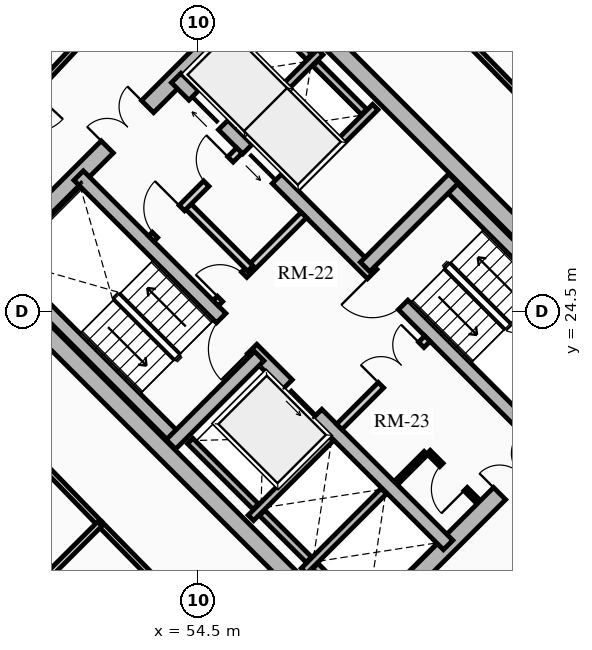
"""IFC4 building model, lengths in metres.
Left out: names, types, materials, properties, quantities, classifications, styles, units other than length and angle.
Written with IfcOpenShell. Run it as: python <this file> out.ifc"""

import sys

from ifc_helpers import new_model, si_unit, direction, frame, frame_2d, origin, place, context, subcontext, project, spatial, rectangle, extrude, source, transform, mapped, element, fill, save


model = new_model("IFC4")
c1 = context("Model", 3, precision=1e-05, world=origin(), true_north=direction((0.0, 1.0)))
c2 = subcontext(c1, "Body", "Model", "MODEL_VIEW")
j1 = project(units=[si_unit("LENGTHUNIT", "METRE"), si_unit("PLANEANGLEUNIT", "RADIAN")], contexts=[c1])
p1 = place(None, origin())
s1 = spatial("IfcSite", under=j1, at=p1, CompositionType="ELEMENT")
p2 = place(p1, origin())
s2 = spatial("IfcBuilding", under=s1, at=p2, CompositionType="ELEMENT")
p3 = place(p2, frame((0.0, 0.0, 81.79)))
s3 = spatial("IfcBuildingStorey", under=s2, at=p3, CompositionType="ELEMENT", Elevation=81.79)
for number, where, z_axis, x_axis in (
    (1, (58.737, 15.697, 0.0), (0.0, 0.0, 1.0), (-0.707, 0.707, 0.0)),
    (2, (66.303, 23.263, 0.0), (0.0, 0.0, 1.0), (-0.707, 0.707, 0.0)),
):
    element("IfcWall", number, at=place(p3, frame(where, z_axis=z_axis, x_axis=x_axis)), inside=s3, PredefinedType="SHEAR", context=c2, shape_type="SweptSolid", body=[
        extrude(rectangle(XDim=14.2, YDim=0.45, at=frame_2d((7.1, 0.0))), origin(), (0.0, 0.0, 1.0), 2.91),
    ])
p4 = place(p3, frame((58.578, 15.856, 0.0), z_axis=(0.0, 0.0, 1.0), x_axis=(0.707106781187, 0.707106781187, 0.0)))
e3 = element("IfcWall", 3, at=p4, inside=s3, PredefinedType="SHEAR", context=c2, shape_type="SweptSolid", body=[
    extrude(rectangle(XDim=10.7, YDim=0.45, at=frame_2d((5.35, 0.0))), origin(), (0.0, 0.0, 1.0), 2.91),
])
m1 = source(origin(), c2, "Body", "SweptSolid", [
    extrude(rectangle(XDim=1.5, YDim=2.02, at=frame_2d((0.75, 1.01))), frame((0.0, 0.235, 0.0), z_axis=(0.0, -1.0, 0.0), x_axis=(1.0, 0.0, 0.0)), (0.0, 0.0, 1.0), 0.47),
])
p5 = place(p4, frame((5.45, 0.0, 0.0)))
e4 = element("IfcOpeningElement", 4, at=p5, cuts=e3, PredefinedType="OPENING", context=c2, shape_type="MappedRepresentation", body=[
    mapped(m1, transform((0.0, 0.0, 0.0), x_axis=(1.0, 0.0, 0.0), y_axis=(0.0, 1.0, 0.0), z_axis=(0.0, 0.0, 1.0), scale=1.0)),
])
p6 = place(p3, frame((48.856, 25.578, 0.0), z_axis=(0.0, 0.0, 1.0), x_axis=(0.707106781187, 0.707106781187, 0.0)))
e5 = element("IfcWall", 5, at=p6, inside=s3, PredefinedType="SHEAR", context=c2, shape_type="SweptSolid", body=[
    extrude(rectangle(XDim=10.7, YDim=0.45, at=frame_2d((5.35, 0.0))), origin(), (0.0, 0.0, 1.0), 2.91),
])
p7 = place(p6, frame((4.6, 0.0, 0.0)))
e6 = element("IfcOpeningElement", 6, at=p7, cuts=e5, PredefinedType="OPENING", context=c2, shape_type="MappedRepresentation", body=[
    mapped(m1, transform((0.0, 0.0, 0.0), x_axis=(1.0, 0.0, 0.0), y_axis=(0.0, 1.0, 0.0), z_axis=(0.0, 0.0, 1.0), scale=1.0)),
])
p8 = place(p3, frame((61.078, 18.355, 0.0), z_axis=(0.0, 0.0, 1.0), x_axis=(-0.707106781187, 0.707106781187, 0.0)))
e7 = element("IfcWall", 7, at=p8, inside=s3, PredefinedType="SHEAR", context=c2, shape_type="SweptSolid", body=[
    extrude(rectangle(XDim=13.75, YDim=0.35, at=frame_2d((6.875, 0.0))), origin(), (0.0, 0.0, 1.0), 2.91),
])
m2 = source(origin(), c2, "Body", "SweptSolid", [
    extrude(rectangle(XDim=1.1, YDim=2.015, at=frame_2d((0.55, 1.007))), frame((0.0, 0.185, 0.0), z_axis=(0.0, -1.0, 0.0), x_axis=(1.0, 0.0, 0.0)), (0.0, 0.0, 1.0), 0.37),
])
p9 = place(p8, frame((4.875, 0.0, 0.0)))
e8 = element("IfcOpeningElement", 8, at=p9, cuts=e7, PredefinedType="OPENING", context=c2, shape_type="MappedRepresentation", body=[
    mapped(m2, transform((0.0, 0.0, 0.0), x_axis=(1.0, 0.0, 0.0), y_axis=(0.0, 1.0, 0.0), z_axis=(0.0, 0.0, 1.0), scale=1.0)),
])
m3 = source(origin(), c2, "Body", "SweptSolid", [
    extrude(rectangle(XDim=1.15, YDim=2.02, at=frame_2d((0.575, 1.01))), frame((0.0, 0.185, 0.0), z_axis=(0.0, -1.0, 0.0), x_axis=(1.0, 0.0, 0.0)), (0.0, 0.0, 1.0), 0.37),
])
p10 = place(p8, frame((7.295, 0.0, 0.0)))
e9 = element("IfcOpeningElement", 9, at=p10, cuts=e7, PredefinedType="OPENING", context=c2, shape_type="MappedRepresentation", body=[
    mapped(m3, transform((0.0, 0.0, 0.0), x_axis=(1.0, 0.0, 0.0), y_axis=(0.0, 1.0, 0.0), z_axis=(0.0, 0.0, 1.0), scale=1.0)),
])
p11 = place(p3, frame((63.645, 20.922, 0.0), z_axis=(0.0, 0.0, 1.0), x_axis=(-0.707106781187, 0.707106781187, 0.0)))
e10 = element("IfcWall", 10, at=p11, inside=s3, PredefinedType="SHEAR", context=c2, shape_type="SweptSolid", body=[
    extrude(rectangle(XDim=13.75, YDim=0.35, at=frame_2d((6.875, 0.0))), origin(), (0.0, 0.0, 1.0), 2.91),
])
p12 = place(p11, frame((10.0, 0.0, 0.0)))
e11 = element("IfcOpeningElement", 11, at=p12, cuts=e10, PredefinedType="OPENING", context=c2, shape_type="MappedRepresentation", body=[
    mapped(m2, transform((0.0, 0.0, 0.0), x_axis=(1.0, 0.0, 0.0), y_axis=(0.0, 1.0, 0.0), z_axis=(0.0, 0.0, 1.0), scale=1.0)),
])
p13 = place(p11, frame((12.0, 0.0, 0.0)))
e12 = element("IfcOpeningElement", 12, at=p13, cuts=e10, PredefinedType="OPENING", context=c2, shape_type="MappedRepresentation", body=[
    mapped(m2, transform((0.0, 0.0, 0.0), x_axis=(1.0, 0.0, 0.0), y_axis=(0.0, 1.0, 0.0), z_axis=(0.0, 0.0, 1.0), scale=1.0)),
])
p14 = place(p11, frame((5.305, 0.0, 0.0)))
e13 = element("IfcOpeningElement", 13, at=p14, cuts=e10, PredefinedType="OPENING", context=c2, shape_type="MappedRepresentation", body=[
    mapped(m3, transform((0.0, 0.0, 0.0), x_axis=(1.0, 0.0, 0.0), y_axis=(0.0, 1.0, 0.0), z_axis=(0.0, 0.0, 1.0), scale=1.0)),
])
p15 = place(p3, frame((53.922, 21.141, 0.0), z_axis=(0.0, 0.0, 1.0), x_axis=(-0.707088616009, 0.707124945897, 0.0)))
e14 = element("IfcWall", 14, at=p15, inside=s3, PredefinedType="SHEAR", context=c2, shape_type="SweptSolid", body=[
    extrude(rectangle(XDim=6.72, YDim=0.35, at=frame_2d((3.36, 0.0))), origin(), (0.0, 0.0, 1.0), 2.91),
])
p16 = place(p3, frame((53.784, 21.003, 0.0), z_axis=(0.0, 0.0, 1.0), x_axis=(0.707106781187, 0.707106781187, 0.0)))
e15 = element("IfcWall", 15, at=p16, inside=s3, PredefinedType="SHEAR", context=c2, shape_type="SweptSolid", body=[
    extrude(rectangle(XDim=3.285, YDim=0.35, at=frame_2d((1.643, 0.0))), origin(), (0.0, 0.0, 1.0), 2.91),
])
p17 = place(p3, frame((65.83, 23.107, 0.0), z_axis=(0.0, 0.0, 1.0), x_axis=(-0.707088616009, 0.707124945897, 0.0)))
e16 = element("IfcWall", 16, at=p17, inside=s3, PredefinedType="SHEAR", context=c2, shape_type="SweptSolid", body=[
    extrude(rectangle(XDim=6.72, YDim=0.35, at=frame_2d((3.36, 0.0))), origin(), (0.0, 0.0, 1.0), 2.91),
])
p18 = place(p3, frame((58.893, 25.674, 0.0), z_axis=(0.0, 0.0, 1.0), x_axis=(0.707106781187, 0.707106781187, 0.0)))
e17 = element("IfcWall", 17, at=p18, inside=s3, PredefinedType="SHEAR", context=c2, shape_type="SweptSolid", body=[
    extrude(rectangle(XDim=3.285, YDim=0.35, at=frame_2d((1.643, 0.0))), origin(), (0.0, 0.0, 1.0), 2.91),
])
p19 = place(p3, frame((55.888, 19.069, 0.0), z_axis=(0.0, 0.0, 1.0), x_axis=(0.707106781187, 0.707106781187, 0.0)))
e18 = element("IfcWall", 18, at=p19, inside=s3, PredefinedType="SHEAR", context=c2, shape_type="SweptSolid", body=[
    extrude(rectangle(XDim=2.97, YDim=0.2, at=frame_2d((1.485, 0.0))), origin(), (0.0, 0.0, 1.0), 2.91),
])
p20 = place(p3, frame((56.015, 19.366, 0.0), z_axis=(0.0, 0.0, 1.0), x_axis=(-0.707106781187, 0.707106781187, 0.0)))
e19 = element("IfcWall", 19, at=p20, inside=s3, PredefinedType="SHEAR", context=c2, shape_type="SweptSolid", body=[
    extrude(rectangle(XDim=2.44, YDim=0.2, at=frame_2d((1.22, 0.0))), origin(), (0.0, 0.0, 1.0), 2.91),
])
p21 = place(p3, frame((57.284, 17.673, 0.0), z_axis=(0.0, 0.0, 1.0), x_axis=(0.707147878904, 0.70706568108, 0.0)))
e20 = element("IfcWall", 20, at=p21, inside=s3, PredefinedType="SHEAR", context=c2, shape_type="SweptSolid", body=[
    extrude(rectangle(XDim=2.97, YDim=0.2, at=frame_2d((1.485, 0.0))), origin(), (0.0, 0.0, 1.0), 2.91),
])
p22 = place(p3, frame((57.412, 17.97, 0.0), z_axis=(0.0, 0.0, 1.0), x_axis=(-0.707106781187, 0.707106781187, 0.0)))
e21 = element("IfcWall", 21, at=p22, inside=s3, PredefinedType="SHEAR", context=c2, shape_type="SweptSolid", body=[
    extrude(rectangle(XDim=1.735, YDim=0.2, at=frame_2d((0.867, 0.0))), origin(), (0.0, 0.0, 1.0), 2.91),
])
p23 = place(p3, frame((58.737, 16.644, 0.0), z_axis=(0.0, 0.0, 1.0), x_axis=(-0.707032117043, 0.707181437447, 0.0)))
e22 = element("IfcWall", 22, at=p23, inside=s3, PredefinedType="SHEAR", context=c2, shape_type="SweptSolid", body=[
    extrude(rectangle(XDim=1.635, YDim=0.2, at=frame_2d((0.817, 0.0))), origin(), (0.0, 0.0, 1.0), 2.91),
])
p24 = place(p3, frame((57.062, 27.781, 0.0), z_axis=(0.0, 0.0, 1.0), x_axis=(0.707106781187, 0.707106781187, 0.0)))
e23 = element("IfcWall", 23, at=p24, inside=s3, PredefinedType="SHEAR", context=c2, shape_type="SweptSolid", body=[
    extrude(rectangle(XDim=2.97, YDim=0.2, at=frame_2d((1.485, 0.0))), origin(), (0.0, 0.0, 1.0), 2.91),
])
p25 = place(p3, frame((55.615, 29.227, 0.0), z_axis=(0.0, 0.0, 1.0), x_axis=(0.707147878904, 0.70706568108, 0.0)))
e24 = element("IfcWall", 24, at=p25, inside=s3, PredefinedType="SHEAR", context=c2, shape_type="SweptSolid", body=[
    extrude(rectangle(XDim=2.97, YDim=0.2, at=frame_2d((1.485, 0.0))), origin(), (0.0, 0.0, 1.0), 2.91),
])
p26 = place(p3, frame((58.865, 29.754, 0.0), z_axis=(0.0, 0.0, 1.0), x_axis=(-0.707174411312, 0.707039144592, 0.0)))
e25 = element("IfcWall", 25, at=p26, inside=s3, PredefinedType="SHEAR", context=c2, shape_type="SweptSolid", body=[
    extrude(rectangle(XDim=1.805, YDim=0.2, at=frame_2d((0.902, 0.0))), origin(), (0.0, 0.0, 1.0), 2.91),
])
p27 = place(p3, frame((57.419, 31.2, 0.0), z_axis=(0.0, 0.0, 1.0), x_axis=(-0.707032117043, 0.707181437447, 0.0)))
e26 = element("IfcWall", 26, at=p27, inside=s3, PredefinedType="SHEAR", context=c2, shape_type="SweptSolid", body=[
    extrude(rectangle(XDim=1.635, YDim=0.2, at=frame_2d((0.817, 0.0))), origin(), (0.0, 0.0, 1.0), 2.91),
])
p28 = place(p3, frame((58.214, 21.467, 0.0), z_axis=(0.0, 0.0, 1.0), x_axis=(0.707106781187, 0.707106781187, 0.0)))
e27 = element("IfcWall", 27, at=p28, inside=s3, PredefinedType="PARTITIONING", context=c2, shape_type="SweptSolid", body=[
    extrude(rectangle(XDim=3.28, YDim=0.2, at=frame_2d((1.64, 0.0))), origin(), (0.0, 0.0, 1.0), 2.655),
])
m4 = source(origin(), c2, "Body", "SweptSolid", [
    extrude(rectangle(XDim=1.5, YDim=2.02, at=frame_2d((0.75, 1.01))), frame((0.0, 0.11, 0.0), z_axis=(0.0, -1.0, 0.0), x_axis=(1.0, 0.0, 0.0)), (0.0, 0.0, 1.0), 0.22),
])
p29 = place(p28, frame((1.55, 0.0, 0.0)))
e28 = element("IfcOpeningElement", 28, at=p29, cuts=e27, PredefinedType="OPENING", context=c2, shape_type="MappedRepresentation", body=[
    mapped(m4, transform((0.0, 0.0, 0.0), x_axis=(1.0, 0.0, 0.0), y_axis=(0.0, 1.0, 0.0), z_axis=(0.0, 0.0, 1.0), scale=1.0)),
])
p30 = place(p3, frame((54.961, 24.719, 0.0), z_axis=(0.0, 0.0, 1.0), x_axis=(0.707106781187, 0.707106781187, 0.0)))
e29 = element("IfcWall", 29, at=p30, inside=s3, PredefinedType="PARTITIONING", context=c2, shape_type="SweptSolid", body=[
    extrude(rectangle(XDim=3.28, YDim=0.2, at=frame_2d((1.64, 0.0))), origin(), (0.0, 0.0, 1.0), 2.655),
])
m5 = source(origin(), c2, "Body", "SweptSolid", [
    extrude(rectangle(XDim=0.9, YDim=2.005, at=frame_2d((0.45, 1.002))), frame((0.0, 0.11, 0.0), z_axis=(0.0, -1.0, 0.0), x_axis=(1.0, 0.0, 0.0)), (0.0, 0.0, 1.0), 0.22),
])
p31 = place(p30, frame((0.16, 0.0, 0.0)))
e30 = element("IfcOpeningElement", 30, at=p31, cuts=e29, PredefinedType="OPENING", context=c2, shape_type="MappedRepresentation", body=[
    mapped(m5, transform((0.0, 0.0, 0.0), x_axis=(1.0, 0.0, 0.0), y_axis=(0.0, 1.0, 0.0), z_axis=(0.0, 0.0, 1.0), scale=1.0)),
])
p32 = place(p3, frame((55.874, 25.631, 0.0), z_axis=(0.0, 0.0, 1.0), x_axis=(-0.707157639372, 0.707055919343, 0.0)))
e31 = element("IfcWall", 31, at=p32, inside=s3, PredefinedType="PARTITIONING", context=c2, shape_type="SweptSolid", body=[
    extrude(rectangle(XDim=2.4, YDim=0.2, at=frame_2d((1.2, 0.0))), origin(), (0.0, 0.0, 1.0), 2.655),
])
p33 = place(p3, frame((53.264, 26.416, 0.0), z_axis=(0.0, 0.0, 1.0), x_axis=(0.707106781187, 0.707106781187, 0.0)))
e32 = element("IfcWall", 32, at=p33, inside=s3, PredefinedType="PARTITIONING", context=c2, shape_type="SweptSolid", body=[
    extrude(rectangle(XDim=3.28, YDim=0.2, at=frame_2d((1.64, 0.0))), origin(), (0.0, 0.0, 1.0), 2.655),
])
m6 = source(origin(), c2, "Body", "SweptSolid", [
    extrude(rectangle(XDim=1.0, YDim=2.015, at=frame_2d((0.5, 1.007))), frame((0.0, 0.11, 0.0), z_axis=(0.0, -1.0, 0.0), x_axis=(1.0, 0.0, 0.0)), (0.0, 0.0, 1.0), 0.22),
])
p34 = place(p33, frame((0.14, 0.0, 0.0)))
e33 = element("IfcOpeningElement", 33, at=p34, cuts=e32, PredefinedType="OPENING", context=c2, shape_type="MappedRepresentation", body=[
    mapped(m6, transform((0.0, 0.0, 0.0), x_axis=(1.0, 0.0, 0.0), y_axis=(0.0, 1.0, 0.0), z_axis=(0.0, 0.0, 1.0), scale=1.0)),
])
p35 = place(p33, frame((2.05, 0.0, 0.0)))
e34 = element("IfcOpeningElement", 34, at=p35, cuts=e32, PredefinedType="OPENING", context=c2, shape_type="MappedRepresentation", body=[
    mapped(m5, transform((0.0, 0.0, 0.0), x_axis=(1.0, 0.0, 0.0), y_axis=(0.0, 1.0, 0.0), z_axis=(0.0, 0.0, 1.0), scale=1.0)),
])
p36 = place(p3, frame((61.835, 19.529, 0.0), z_axis=(0.0, 0.0, 1.0), x_axis=(-0.707174592913, 0.707038962956, 0.0)))
e35 = element("IfcWall", 35, at=p36, inside=s3, PredefinedType="PARTITIONING", context=c2, shape_type="SweptSolid", body=[
    extrude(rectangle(XDim=1.8, YDim=0.125, at=frame_2d((0.9, 0.0))), origin(), (0.0, 0.0, 1.0), 2.655),
])
m7 = source(origin(), c2, "Body", "SweptSolid", [
    extrude(rectangle(XDim=0.9, YDim=2.005, at=frame_2d((0.45, 1.002))), frame((0.0, 0.073, 0.0), z_axis=(0.0, -1.0, 0.0), x_axis=(1.0, 0.0, 0.0)), (0.0, 0.0, 1.0), 0.145),
])
p37 = place(p36, frame((0.42, 0.0, 0.0)))
e36 = element("IfcOpeningElement", 36, at=p37, cuts=e35, PredefinedType="OPENING", context=c2, shape_type="MappedRepresentation", body=[
    mapped(m7, transform((0.0, 0.0, 0.0), x_axis=(1.0, 0.0, 0.0), y_axis=(0.0, 1.0, 0.0), z_axis=(0.0, 0.0, 1.0), scale=1.0)),
])
p38 = place(p3, frame((59.713, 19.996, 0.0), z_axis=(0.0, 0.0, 1.0), x_axis=(0.707217726, 0.706995818963, 0.0)))
e37 = element("IfcWall", 37, at=p38, inside=s3, PredefinedType="PARTITIONING", context=c2, shape_type="SweptSolid", body=[
    extrude(rectangle(XDim=1.1, YDim=0.125, at=frame_2d((0.55, 0.0))), origin(), (0.0, 0.0, 1.0), 2.655),
])
p39 = place(p3, frame((63.086, 30.086, 0.0), z_axis=(0.0, 0.0, 1.0), x_axis=(-0.699075897379, 0.715047473741, 0.0)))
e38 = element("IfcWall", 38, at=p39, inside=s3, PredefinedType="PARTITIONING", context=c2, shape_type="SweptSolid", body=[
    extrude(rectangle(XDim=6.114, YDim=0.15, at=frame_2d((3.057, 0.0))), origin(), (0.0, 0.0, 1.0), 2.225),
])
p40 = place(p3, frame((52.043, 32.28, 0.0), z_axis=(0.0, 0.0, 1.0), x_axis=(-0.682606081633, -0.730786519661, 0.0)))
e39 = element("IfcWall", 39, at=p40, inside=s3, PredefinedType="PARTITIONING", context=c2, shape_type="SweptSolid", body=[
    extrude(rectangle(XDim=6.527, YDim=0.15, at=frame_2d((3.263, 0.0))), origin(), (0.0, 0.0, 1.0), 2.225),
])
m8 = source(origin(), c2, "Body", "SweptSolid", [
    extrude(rectangle(XDim=1.05, YDim=2.015, at=frame_2d((0.525, 1.007))), frame((0.0, 0.085, 0.0), z_axis=(0.0, -1.0, 0.0), x_axis=(1.0, 0.0, 0.0)), (0.0, 0.0, 1.0), 0.17),
])
p41 = place(p40, frame((2.738, 0.0, 0.0)))
e40 = element("IfcOpeningElement", 40, at=p41, cuts=e39, PredefinedType="OPENING", context=c2, shape_type="MappedRepresentation", body=[
    mapped(m8, transform((0.0, 0.0, 0.0), x_axis=(1.0, 0.0, 0.0), y_axis=(0.0, 1.0, 0.0), z_axis=(0.0, 0.0, 1.0), scale=1.0)),
])
p42 = place(p3, frame((47.706, 23.253, 0.0), z_axis=(0.0, 0.0, 1.0), x_axis=(0.696179266346, -0.717867974707, 0.0)))
e41 = element("IfcWall", 41, at=p42, inside=s3, PredefinedType="PARTITIONING", context=c2, shape_type="SweptSolid", body=[
    extrude(rectangle(XDim=6.045, YDim=0.15, at=frame_2d((3.022, 0.0))), origin(), (0.0, 0.0, 1.0), 2.655),
])
p43 = place(p42, frame((2.497, 0.0, 0.0)))
e42 = element("IfcOpeningElement", 42, at=p43, cuts=e41, PredefinedType="OPENING", context=c2, shape_type="MappedRepresentation", body=[
    mapped(m8, transform((0.0, 0.0, 0.0), x_axis=(1.0, 0.0, 0.0), y_axis=(0.0, 1.0, 0.0), z_axis=(0.0, 0.0, 1.0), scale=1.0)),
])
p44 = place(p3, frame((51.914, 18.914, 0.0), z_axis=(0.0, 0.0, 1.0), x_axis=(0.699999313799, -0.714143515465, 0.0)))
e43 = element("IfcWall", 43, at=p44, inside=s3, PredefinedType="PARTITIONING", context=c2, shape_type="SweptSolid", body=[
    extrude(rectangle(XDim=6.162, YDim=0.15, at=frame_2d((3.081, 0.0))), origin(), (0.0, 0.0, 1.0), 2.225),
])
p45 = place(p3, frame((51.914, 18.914, 0.0), z_axis=(0.0, 0.0, 1.0), x_axis=(-0.707106781187, -0.707106781187, 0.0)))
e44 = element("IfcWall", 44, at=p45, inside=s3, PredefinedType="PARTITIONING", context=c2, shape_type="SweptSolid", body=[
    extrude(rectangle(XDim=7.661, YDim=0.16, at=frame_2d((3.831, 0.0))), origin(), (0.0, 0.0, 1.0), 2.179),
])
m9 = source(origin(), c2, "Body", "SweptSolid", [
    extrude(rectangle(XDim=1.1, YDim=2.015, at=frame_2d((0.55, 1.007))), frame((0.0, 0.025, 0.0), z_axis=(0.0, -1.0, 0.0), x_axis=(1.0, 0.0, 0.0)), (0.0, 0.0, 1.0), 0.05),
])
p46 = place(p9, origin())
e45 = element("IfcDoor", 45, at=p46, inside=s3, OperationType="SLIDING_TO_LEFT", PredefinedType="DOOR", context=c2, shape_type="MappedRepresentation", body=[
    mapped(m9, transform((0.0, 0.0, 0.0), x_axis=(1.0, 0.0, 0.0), y_axis=(0.0, 1.0, 0.0), z_axis=(0.0, 0.0, 1.0), scale=1.0)),
])
fill(e8, e45)
p47 = place(p12, origin())
e46 = element("IfcDoor", 46, at=p47, inside=s3, OperationType="SLIDING_TO_LEFT", PredefinedType="DOOR", context=c2, shape_type="MappedRepresentation", body=[
    mapped(m9, transform((0.0, 0.0, 0.0), x_axis=(1.0, 0.0, 0.0), y_axis=(0.0, 1.0, 0.0), z_axis=(0.0, 0.0, 1.0), scale=1.0)),
])
fill(e11, e46)
p48 = place(p13, origin())
e47 = element("IfcDoor", 47, at=p48, inside=s3, OperationType="SLIDING_TO_RIGHT", PredefinedType="DOOR", context=c2, shape_type="MappedRepresentation", body=[
    mapped(m9, transform((0.0, 0.0, 0.0), x_axis=(1.0, 0.0, 0.0), y_axis=(0.0, 1.0, 0.0), z_axis=(0.0, 0.0, 1.0), scale=1.0)),
])
fill(e12, e47)
m10 = source(origin(), c2, "Body", "SweptSolid", [
    extrude(rectangle(XDim=1.15, YDim=2.02, at=frame_2d((0.575, 1.01))), frame((0.0, 0.025, 0.0), z_axis=(0.0, -1.0, 0.0), x_axis=(1.0, 0.0, 0.0)), (0.0, 0.0, 1.0), 0.05),
])
p49 = place(p10, origin())
e48 = element("IfcDoor", 48, at=p49, inside=s3, OperationType="SINGLE_SWING_LEFT", PredefinedType="DOOR", context=c2, shape_type="MappedRepresentation", body=[
    mapped(m10, transform((0.0, 0.0, 0.0), x_axis=(1.0, 0.0, 0.0), y_axis=(0.0, 1.0, 0.0), z_axis=(0.0, 0.0, 1.0), scale=1.0)),
])
fill(e9, e48)
p50 = place(p14, origin())
e49 = element("IfcDoor", 49, at=p50, inside=s3, OperationType="SINGLE_SWING_RIGHT", PredefinedType="DOOR", context=c2, shape_type="MappedRepresentation", body=[
    mapped(m10, transform((0.0, 0.0, 0.0), x_axis=(1.0, 0.0, 0.0), y_axis=(0.0, 1.0, 0.0), z_axis=(0.0, 0.0, 1.0), scale=1.0)),
])
fill(e13, e49)
m11 = source(origin(), c2, "Body", "SweptSolid", [
    extrude(rectangle(XDim=1.5, YDim=2.02, at=frame_2d((0.75, 1.01))), frame((0.0, 0.025, 0.0), z_axis=(0.0, -1.0, 0.0), x_axis=(1.0, 0.0, 0.0)), (0.0, 0.0, 1.0), 0.05),
])
p51 = place(p7, origin())
e50 = element("IfcDoor", 50, at=p51, inside=s3, OperationType="DOUBLE_DOOR_SINGLE_SWING", PredefinedType="DOOR", context=c2, shape_type="MappedRepresentation", body=[
    mapped(m11, transform((0.0, 0.0, 0.0), x_axis=(1.0, 0.0, 0.0), y_axis=(0.0, 1.0, 0.0), z_axis=(0.0, 0.0, 1.0), scale=1.0)),
])
fill(e6, e50)
p52 = place(p5, origin())
e51 = element("IfcDoor", 51, at=p52, inside=s3, OperationType="DOUBLE_DOOR_SINGLE_SWING", PredefinedType="DOOR", context=c2, shape_type="MappedRepresentation", body=[
    mapped(m11, transform((0.0, 0.0, 0.0), x_axis=(1.0, 0.0, 0.0), y_axis=(0.0, 1.0, 0.0), z_axis=(0.0, 0.0, 1.0), scale=1.0)),
])
fill(e4, e51)
p53 = place(p29, origin())
e52 = element("IfcDoor", 52, at=p53, inside=s3, OperationType="DOUBLE_DOOR_SINGLE_SWING", PredefinedType="DOOR", context=c2, shape_type="MappedRepresentation", body=[
    mapped(m11, transform((0.0, 0.0, 0.0), x_axis=(1.0, 0.0, 0.0), y_axis=(0.0, 1.0, 0.0), z_axis=(0.0, 0.0, 1.0), scale=1.0)),
])
fill(e28, e52)
m12 = source(origin(), c2, "Body", "SweptSolid", [
    extrude(rectangle(XDim=0.9, YDim=2.005, at=frame_2d((0.45, 1.002))), frame((0.0, 0.025, 0.0), z_axis=(0.0, -1.0, 0.0), x_axis=(1.0, 0.0, 0.0)), (0.0, 0.0, 1.0), 0.05),
])
p54 = place(p31, origin())
e53 = element("IfcDoor", 53, at=p54, inside=s3, OperationType="SINGLE_SWING_LEFT", PredefinedType="DOOR", context=c2, shape_type="MappedRepresentation", body=[
    mapped(m12, transform((0.0, 0.0, 0.0), x_axis=(1.0, 0.0, 0.0), y_axis=(0.0, 1.0, 0.0), z_axis=(0.0, 0.0, 1.0), scale=1.0)),
])
fill(e30, e53)
m13 = source(origin(), c2, "Body", "SweptSolid", [
    extrude(rectangle(XDim=1.0, YDim=2.015, at=frame_2d((0.5, 1.007))), frame((0.0, 0.025, 0.0), z_axis=(0.0, -1.0, 0.0), x_axis=(1.0, 0.0, 0.0)), (0.0, 0.0, 1.0), 0.05),
])
p55 = place(p34, origin())
e54 = element("IfcDoor", 54, at=p55, inside=s3, OperationType="SINGLE_SWING_RIGHT", PredefinedType="DOOR", context=c2, shape_type="MappedRepresentation", body=[
    mapped(m13, transform((0.0, 0.0, 0.0), x_axis=(1.0, 0.0, 0.0), y_axis=(0.0, 1.0, 0.0), z_axis=(0.0, 0.0, 1.0), scale=1.0)),
])
fill(e33, e54)
p56 = place(p37, origin())
e55 = element("IfcDoor", 55, at=p56, inside=s3, OperationType="SINGLE_SWING_LEFT", PredefinedType="DOOR", context=c2, shape_type="MappedRepresentation", body=[
    mapped(m12, transform((0.0, 0.0, 0.0), x_axis=(1.0, 0.0, 0.0), y_axis=(0.0, 1.0, 0.0), z_axis=(0.0, 0.0, 1.0), scale=1.0)),
])
fill(e36, e55)
p57 = place(p35, origin())
e56 = element("IfcDoor", 56, at=p57, inside=s3, OperationType="SINGLE_SWING_RIGHT", PredefinedType="DOOR", context=c2, shape_type="MappedRepresentation", body=[
    mapped(m12, transform((0.0, 0.0, 0.0), x_axis=(1.0, 0.0, 0.0), y_axis=(0.0, 1.0, 0.0), z_axis=(0.0, 0.0, 1.0), scale=1.0)),
])
fill(e34, e56)
save(model, sys.argv[1])
